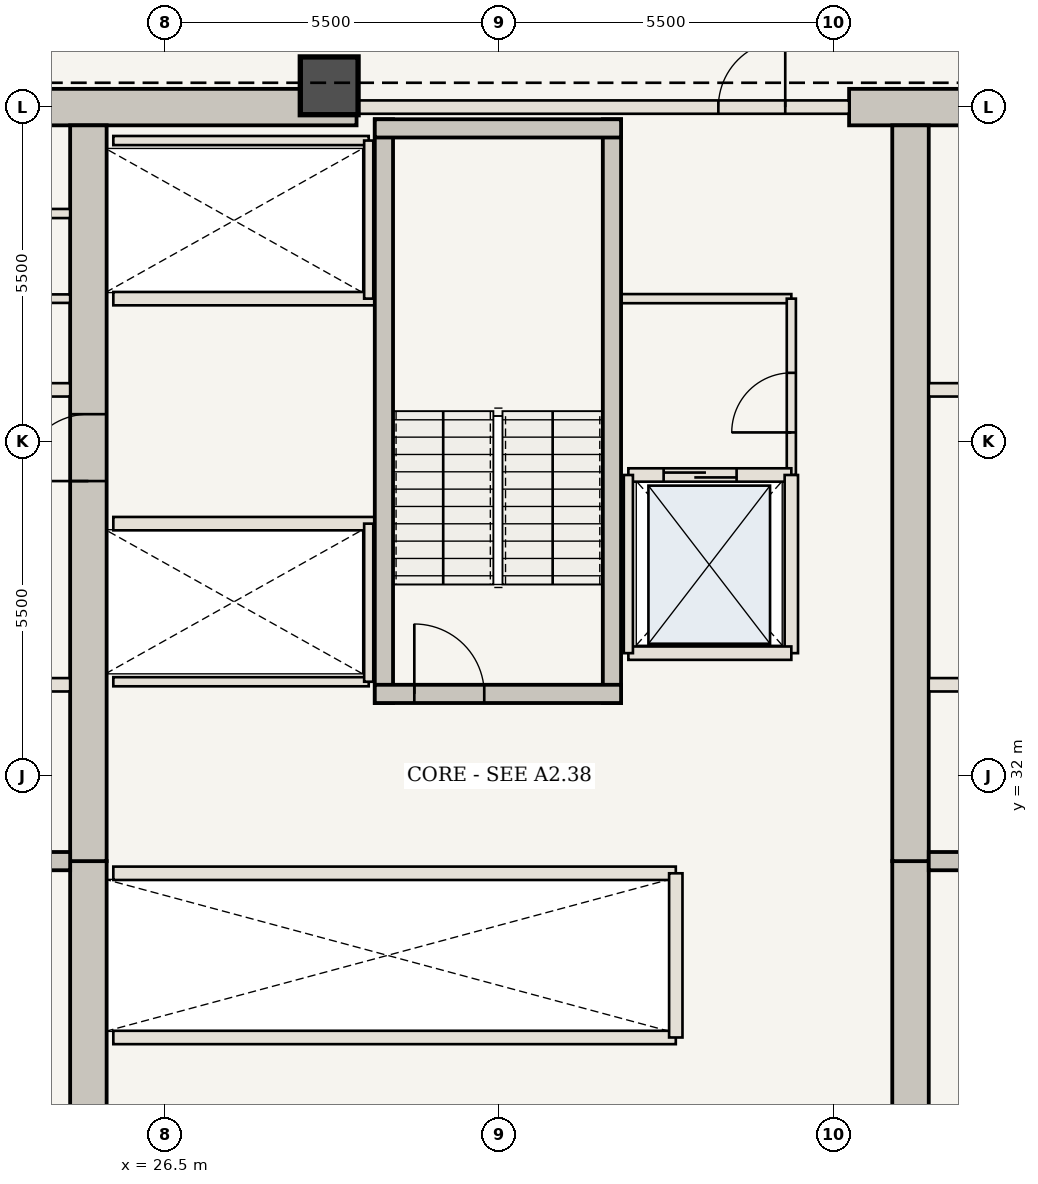
"""IFC4 building model, lengths in metres.
Left out: names, types, materials, properties, quantities, classifications, styles, units other than length and angle.
Written with IfcOpenShell. Run it as: python <this file> out.ifc"""

import sys

from ifc_helpers import new_model, si_unit, direction, frame, frame_2d, origin, origin_2d, place, context, subcontext, project, spatial, rectangle, extrude, element, fill, save


model = new_model("IFC4")
c1 = context("Model", 3, precision=1e-05, world=origin(), true_north=direction((0.0, 1.0)))
c2 = subcontext(c1, "Body", "Model", "MODEL_VIEW")
j1 = project(units=[si_unit("LENGTHUNIT", "METRE"), si_unit("PLANEANGLEUNIT", "RADIAN")], contexts=[c1])
p1 = place(None, origin())
s1 = spatial("IfcSite", under=j1, at=p1, CompositionType="ELEMENT")
p2 = place(p1, origin())
s2 = spatial("IfcBuilding", under=s1, at=p2, CompositionType="ELEMENT")
p3 = place(p2, frame((0.0, 0.0, 168.35)))
s3 = spatial("IfcBuildingStorey", under=s2, at=p3, CompositionType="ELEMENT", Elevation=168.35)
p4 = place(p3, frame((21.41, 43.0, 0.0), z_axis=(0.0, 0.0, 1.0), x_axis=(1.0, 0.0, 0.0)))
e1 = element("IfcWall", 1, at=p4, inside=s3, PredefinedType="SHEAR", context=c2, shape_type="SweptSolid", body=[
    extrude(rectangle(XDim=8.24, YDim=0.6, at=frame_2d((4.12, 0.0))), origin(), (0.0, 0.0, 1.0), 3.85),
])
p5 = place(p3, frame((37.75, 43.0, 0.0), z_axis=(0.0, 0.0, 1.0), x_axis=(1.0, 0.0, 0.0)))
e2 = element("IfcWall", 2, at=p5, inside=s3, PredefinedType="SHEAR", context=c2, shape_type="SweptSolid", body=[
    extrude(rectangle(XDim=4.84, YDim=0.6, at=frame_2d((2.42, 0.0))), origin(), (0.0, 0.0, 1.0), 3.85),
])
p6 = place(p3, frame((25.24, 21.25, 0.0), z_axis=(0.0, 0.0, 1.0), x_axis=(0.0, 1.0, 0.0)))
e3 = element("IfcWall", 3, at=p6, inside=s3, PredefinedType="SHEAR", context=c2, shape_type="SweptSolid", body=[
    extrude(rectangle(XDim=9.35, YDim=0.6, at=frame_2d((4.675, 0.0))), origin(), (0.0, 0.0, 1.0), 3.85),
])
p7 = place(p3, frame((25.24, 30.6, 0.0), z_axis=(0.0, 0.0, 1.0), x_axis=(0.0, 1.0, 0.0)))
e4 = element("IfcWall", 4, at=p7, inside=s3, PredefinedType="SHEAR", context=c2, shape_type="SweptSolid", body=[
    extrude(rectangle(XDim=12.1, YDim=0.6, at=frame_2d((6.05, 0.0))), origin(), (0.0, 0.0, 1.0), 3.85),
])
p8 = place(p7, frame((6.25, 0.0, 0.0)))
e5 = element("IfcOpeningElement", 5, at=p8, cuts=e4, PredefinedType="OPENING", context=c2, shape_type="SweptSolid", body=[
    extrude(rectangle(XDim=1.1, YDim=2.15, at=frame_2d((0.55, 1.075))), frame((0.0, 0.31, 0.0), z_axis=(0.0, -1.0, 0.0), x_axis=(1.0, 0.0, 0.0)), (0.0, 0.0, 1.0), 0.62),
])
p9 = place(p3, frame((38.76, 21.25, 0.0), z_axis=(0.0, 0.0, 1.0), x_axis=(0.0, 1.0, 0.0)))
e6 = element("IfcWall", 6, at=p9, inside=s3, PredefinedType="SHEAR", context=c2, shape_type="SweptSolid", body=[
    extrude(rectangle(XDim=9.35, YDim=0.6, at=frame_2d((4.675, 0.0))), origin(), (0.0, 0.0, 1.0), 3.85),
])
p10 = place(p3, frame((38.76, 30.6, 0.0), z_axis=(0.0, 0.0, 1.0), x_axis=(0.0, 1.0, 0.0)))
e7 = element("IfcWall", 7, at=p10, inside=s3, PredefinedType="SHEAR", context=c2, shape_type="SweptSolid", body=[
    extrude(rectangle(XDim=12.1, YDim=0.6, at=frame_2d((6.05, 0.0))), origin(), (0.0, 0.0, 1.0), 3.85),
])
p11 = place(p3, frame((29.2, 43.35, 0.0), z_axis=(0.0, 0.0, 1.0), x_axis=(1.0, 0.0, 0.0)))
e8 = element("IfcColumn", 8, at=p11, inside=s3, PredefinedType="COLUMN", context=c2, shape_type="SweptSolid", body=[
    extrude(rectangle(XDim=0.95, YDim=0.95, at=origin_2d()), origin(), (0.0, 0.0, 1.0), 3.85),
])
for number, where, z_axis, x_axis in (
    (9, (21.41, 30.6, 0.0), (0.0, 0.0, 1.0), (1.0, 0.0, 0.0)),
    (10, (39.06, 30.6, 0.0), (0.0, 0.0, 1.0), (1.0, 0.0, 0.0)),
):
    element("IfcWall", number, at=place(p3, frame(where, z_axis=z_axis, x_axis=x_axis)), inside=s3, PredefinedType="SHEAR", context=c2, shape_type="SweptSolid", body=[
        extrude(rectangle(XDim=3.53, YDim=0.3, at=frame_2d((1.765, 0.0))), origin(), (0.0, 0.0, 1.0), 3.685),
    ])
p12 = place(p3, frame((21.41, 33.5, 0.0), z_axis=(0.0, 0.0, 1.0), x_axis=(1.0, 0.0, 0.0)))
e11 = element("IfcWall", 11, at=p12, inside=s3, PredefinedType="STANDARD", context=c2, shape_type="SweptSolid", body=[
    extrude(rectangle(XDim=3.53, YDim=0.22, at=frame_2d((1.765, 0.0))), origin(), (0.0, 0.0, 1.0), 3.685),
])
p13 = place(p12, frame((0.75, 0.0, 0.0)))
e12 = element("IfcOpeningElement", 12, at=p13, cuts=e11, PredefinedType="OPENING", context=c2, shape_type="SweptSolid", body=[
    extrude(rectangle(XDim=1.2, YDim=2.2, at=frame_2d((0.6, 1.1))), frame((0.0, 0.12, 0.0), z_axis=(0.0, -1.0, 0.0), x_axis=(1.0, 0.0, 0.0)), (0.0, 0.0, 1.0), 0.24),
])
p14 = place(p3, frame((39.06, 33.5, 0.0), z_axis=(0.0, 0.0, 1.0), x_axis=(1.0, 0.0, 0.0)))
e13 = element("IfcWall", 13, at=p14, inside=s3, PredefinedType="STANDARD", context=c2, shape_type="SweptSolid", body=[
    extrude(rectangle(XDim=3.53, YDim=0.22, at=frame_2d((1.765, 0.0))), origin(), (0.0, 0.0, 1.0), 3.685),
])
p15 = place(p14, frame((1.55, 0.0, 0.0)))
e14 = element("IfcOpeningElement", 14, at=p15, cuts=e13, PredefinedType="OPENING", context=c2, shape_type="SweptSolid", body=[
    extrude(rectangle(XDim=1.2, YDim=2.2, at=frame_2d((0.6, 1.1))), frame((0.0, 0.12, 0.0), z_axis=(0.0, -1.0, 0.0), x_axis=(1.0, 0.0, 0.0)), (0.0, 0.0, 1.0), 0.24),
])
for number, where, z_axis, x_axis in (
    (15, (21.41, 38.35, 0.0), (0.0, 0.0, 1.0), (1.0, 0.0, 0.0)),
    (16, (39.06, 38.35, 0.0), (0.0, 0.0, 1.0), (1.0, 0.0, 0.0)),
):
    element("IfcWall", number, at=place(p3, frame(where, z_axis=z_axis, x_axis=x_axis)), inside=s3, PredefinedType="STANDARD", context=c2, shape_type="SweptSolid", body=[
        extrude(rectangle(XDim=3.53, YDim=0.22, at=frame_2d((1.765, 0.0))), origin(), (0.0, 0.0, 1.0), 3.685),
    ])
p16 = place(p3, frame((21.41, 39.85, 0.0), z_axis=(0.0, 0.0, 1.0), x_axis=(1.0, 0.0, 0.0)))
e17 = element("IfcWall", 17, at=p16, inside=s3, PredefinedType="STANDARD", context=c2, shape_type="SweptSolid", body=[
    extrude(rectangle(XDim=3.53, YDim=0.14, at=frame_2d((1.765, 0.0))), origin(), (0.0, 0.0, 1.0), 3.685),
])
p17 = place(p3, frame((21.41, 41.25, 0.0), z_axis=(0.0, 0.0, 1.0), x_axis=(1.0, 0.0, 0.0)))
e18 = element("IfcWall", 18, at=p17, inside=s3, PredefinedType="STANDARD", context=c2, shape_type="SweptSolid", body=[
    extrude(rectangle(XDim=3.53, YDim=0.15, at=frame_2d((1.765, 0.0))), origin(), (0.0, 0.0, 1.0), 3.685),
])
p18 = place(p3, frame((34.0, 39.85, 0.0), z_axis=(0.0, 0.0, 1.0), x_axis=(1.0, 0.0, 0.0)))
e19 = element("IfcWall", 19, at=p18, inside=s3, PredefinedType="STANDARD", context=c2, shape_type="SweptSolid", body=[
    extrude(rectangle(XDim=2.8, YDim=0.15, at=frame_2d((1.4, 0.0))), origin(), (0.0, 0.0, 1.0), 3.685),
])
p19 = place(p3, frame((36.8, 36.95, 0.0), z_axis=(0.0, 0.0, 1.0), x_axis=(0.0, 1.0, 0.0)))
e20 = element("IfcWall", 20, at=p19, inside=s3, PredefinedType="STANDARD", context=c2, shape_type="SweptSolid", body=[
    extrude(rectangle(XDim=2.9, YDim=0.15, at=frame_2d((1.45, 0.0))), origin(), (0.0, 0.0, 1.0), 3.685),
])
p20 = place(p19, frame((0.7, 0.0, 0.0)))
e21 = element("IfcOpeningElement", 21, at=p20, cuts=e20, PredefinedType="OPENING", context=c2, shape_type="SweptSolid", body=[
    extrude(rectangle(XDim=0.98, YDim=2.2, at=frame_2d((0.49, 1.1))), frame((0.0, 0.085, 0.0), z_axis=(0.0, -1.0, 0.0), x_axis=(1.0, 0.0, 0.0)), (0.0, 0.0, 1.0), 0.17),
])
for number, where, z_axis, x_axis in (
    (22, (25.65, 27.7, 0.0), (0.0, 0.0, 1.0), (1.0, 0.0, 0.0)),
    (23, (25.65, 30.4, 0.0), (0.0, 0.0, 1.0), (1.0, 0.0, 0.0)),
):
    element("IfcWall", number, at=place(p3, frame(where, z_axis=z_axis, x_axis=x_axis)), inside=s3, PredefinedType="STANDARD", context=c2, shape_type="SweptSolid", body=[
        extrude(rectangle(XDim=9.25, YDim=0.22, at=frame_2d((4.625, 0.0))), origin(), (0.0, 0.0, 1.0), 3.685),
    ])
p21 = place(p3, frame((34.9, 27.7, 0.0), z_axis=(0.0, 0.0, 1.0), x_axis=(0.0, 1.0, 0.0)))
e24 = element("IfcWall", 24, at=p21, inside=s3, PredefinedType="STANDARD", context=c2, shape_type="SweptSolid", body=[
    extrude(rectangle(XDim=2.7, YDim=0.22, at=frame_2d((1.35, 0.0))), origin(), (0.0, 0.0, 1.0), 3.685),
])
p22 = place(p3, frame((25.65, 36.15, 0.0), z_axis=(0.0, 0.0, 1.0), x_axis=(1.0, 0.0, 0.0)))
e25 = element("IfcWall", 25, at=p22, inside=s3, PredefinedType="STANDARD", context=c2, shape_type="SweptSolid", body=[
    extrude(rectangle(XDim=4.3, YDim=0.22, at=frame_2d((2.15, 0.0))), origin(), (0.0, 0.0, 1.0), 3.685),
])
p23 = place(p3, frame((25.65, 33.55, 0.0), z_axis=(0.0, 0.0, 1.0), x_axis=(1.0, 0.0, 0.0)))
e26 = element("IfcWall", 26, at=p23, inside=s3, PredefinedType="STANDARD", context=c2, shape_type="SweptSolid", body=[
    extrude(rectangle(XDim=4.2, YDim=0.15, at=frame_2d((2.1, 0.0))), origin(), (0.0, 0.0, 1.0), 3.685),
])
p24 = place(p3, frame((29.85, 33.55, 0.0), z_axis=(0.0, 0.0, 1.0), x_axis=(0.0, 1.0, 0.0)))
e27 = element("IfcWall", 27, at=p24, inside=s3, PredefinedType="STANDARD", context=c2, shape_type="SweptSolid", body=[
    extrude(rectangle(XDim=2.6, YDim=0.15, at=frame_2d((1.3, 0.0))), origin(), (0.0, 0.0, 1.0), 3.685),
])
p25 = place(p3, frame((25.65, 39.85, 0.0), z_axis=(0.0, 0.0, 1.0), x_axis=(1.0, 0.0, 0.0)))
e28 = element("IfcWall", 28, at=p25, inside=s3, PredefinedType="STANDARD", context=c2, shape_type="SweptSolid", body=[
    extrude(rectangle(XDim=4.3, YDim=0.22, at=frame_2d((2.15, 0.0))), origin(), (0.0, 0.0, 1.0), 3.685),
])
p26 = place(p3, frame((25.65, 42.45, 0.0), z_axis=(0.0, 0.0, 1.0), x_axis=(1.0, 0.0, 0.0)))
e29 = element("IfcWall", 29, at=p26, inside=s3, PredefinedType="STANDARD", context=c2, shape_type="SweptSolid", body=[
    extrude(rectangle(XDim=4.2, YDim=0.15, at=frame_2d((2.1, 0.0))), origin(), (0.0, 0.0, 1.0), 3.685),
])
p27 = place(p3, frame((29.85, 39.85, 0.0), z_axis=(0.0, 0.0, 1.0), x_axis=(0.0, 1.0, 0.0)))
e30 = element("IfcWall", 30, at=p27, inside=s3, PredefinedType="STANDARD", context=c2, shape_type="SweptSolid", body=[
    extrude(rectangle(XDim=2.6, YDim=0.15, at=frame_2d((1.3, 0.0))), origin(), (0.0, 0.0, 1.0), 3.685),
])
for number, where, z_axis, x_axis in (
    (31, (30.1, 33.2, 0.0), (0.0, 0.0, 1.0), (0.0, 1.0, 0.0)),
    (32, (33.85, 33.2, 0.0), (0.0, 0.0, 1.0), (0.0, 1.0, 0.0)),
):
    element("IfcWall", number, at=place(p3, frame(where, z_axis=z_axis, x_axis=x_axis)), inside=s3, PredefinedType="SHEAR", context=c2, shape_type="SweptSolid", body=[
        extrude(rectangle(XDim=9.6, YDim=0.3, at=frame_2d((4.8, 0.0))), origin(), (0.0, 0.0, 1.0), 3.685),
    ])
p28 = place(p3, frame((29.95, 33.35, 0.0), z_axis=(0.0, 0.0, 1.0), x_axis=(1.0, 0.0, 0.0)))
e33 = element("IfcWall", 33, at=p28, inside=s3, PredefinedType="SHEAR", context=c2, shape_type="SweptSolid", body=[
    extrude(rectangle(XDim=4.05, YDim=0.3, at=frame_2d((2.025, 0.0))), origin(), (0.0, 0.0, 1.0), 3.685),
])
p29 = place(p28, frame((0.65, 0.0, 0.0)))
e34 = element("IfcOpeningElement", 34, at=p29, cuts=e33, PredefinedType="OPENING", context=c2, shape_type="SweptSolid", body=[
    extrude(rectangle(XDim=1.15, YDim=2.15, at=frame_2d((0.575, 1.075))), frame((0.0, 0.16, 0.0), z_axis=(0.0, -1.0, 0.0), x_axis=(1.0, 0.0, 0.0)), (0.0, 0.0, 1.0), 0.32),
])
p30 = place(p3, frame((29.95, 42.65, 0.0), z_axis=(0.0, 0.0, 1.0), x_axis=(1.0, 0.0, 0.0)))
e35 = element("IfcWall", 35, at=p30, inside=s3, PredefinedType="SHEAR", context=c2, shape_type="SweptSolid", body=[
    extrude(rectangle(XDim=4.05, YDim=0.3, at=frame_2d((2.025, 0.0))), origin(), (0.0, 0.0, 1.0), 3.685),
])
p31 = place(p3, frame((29.65, 43.0, 0.0), z_axis=(0.0, 0.0, 1.0), x_axis=(1.0, 0.0, 0.0)))
e36 = element("IfcWall", 36, at=p31, inside=s3, PredefinedType="STANDARD", context=c2, shape_type="SweptSolid", body=[
    extrude(rectangle(XDim=8.1, YDim=0.22, at=frame_2d((4.05, 0.0))), origin(), (0.0, 0.0, 1.0), 3.685),
])
p32 = place(p31, frame((5.95, 0.0, 0.0)))
e37 = element("IfcOpeningElement", 37, at=p32, cuts=e36, PredefinedType="OPENING", context=c2, shape_type="SweptSolid", body=[
    extrude(rectangle(XDim=1.1, YDim=2.15, at=frame_2d((0.55, 1.075))), frame((0.0, 0.12, 0.0), z_axis=(0.0, -1.0, 0.0), x_axis=(1.0, 0.0, 0.0)), (0.0, 0.0, 1.0), 0.24),
])
p33 = place(p3, frame((34.12, 36.95, 0.0), z_axis=(0.0, 0.0, 1.0), x_axis=(1.0, 0.0, 0.0)))
e38 = element("IfcWall", 38, at=p33, inside=s3, PredefinedType="STANDARD", context=c2, shape_type="SweptSolid", body=[
    extrude(rectangle(XDim=2.68, YDim=0.22, at=frame_2d((1.34, 0.0))), origin(), (0.0, 0.0, 1.0), 3.685),
])
p34 = place(p33, frame((0.58, 0.0, 0.0)))
e39 = element("IfcOpeningElement", 39, at=p34, cuts=e38, PredefinedType="OPENING", context=c2, shape_type="SweptSolid", body=[
    extrude(rectangle(XDim=1.2, YDim=2.2, at=frame_2d((0.6, 1.1))), frame((0.0, 0.12, 0.0), z_axis=(0.0, -1.0, 0.0), x_axis=(1.0, 0.0, 0.0)), (0.0, 0.0, 1.0), 0.24),
])
p35 = place(p3, frame((36.8, 34.02, 0.0), z_axis=(0.0, 0.0, 1.0), x_axis=(0.0, 1.0, 0.0)))
e40 = element("IfcWall", 40, at=p35, inside=s3, PredefinedType="STANDARD", context=c2, shape_type="SweptSolid", body=[
    extrude(rectangle(XDim=2.93, YDim=0.22, at=frame_2d((1.465, 0.0))), origin(), (0.0, 0.0, 1.0), 3.685),
])
p36 = place(p3, frame((34.12, 34.02, 0.0), z_axis=(0.0, 0.0, 1.0), x_axis=(1.0, 0.0, 0.0)))
e41 = element("IfcWall", 41, at=p36, inside=s3, PredefinedType="STANDARD", context=c2, shape_type="SweptSolid", body=[
    extrude(rectangle(XDim=2.68, YDim=0.22, at=frame_2d((1.34, 0.0))), origin(), (0.0, 0.0, 1.0), 3.685),
])
p37 = place(p3, frame((34.12, 34.02, 0.0), z_axis=(0.0, 0.0, 1.0), x_axis=(0.0, 1.0, 0.0)))
e42 = element("IfcWall", 42, at=p37, inside=s3, PredefinedType="STANDARD", context=c2, shape_type="SweptSolid", body=[
    extrude(rectangle(XDim=2.93, YDim=0.15, at=frame_2d((1.465, 0.0))), origin(), (0.0, 0.0, 1.0), 3.685),
])
p38 = place(p8, origin())
e43 = element("IfcDoor", 43, at=p38, inside=s3, OperationType="SINGLE_SWING_LEFT", PredefinedType="DOOR", context=c2, shape_type="SweptSolid", body=[
    extrude(rectangle(XDim=1.1, YDim=2.15, at=frame_2d((0.55, 1.075))), frame((0.0, 0.025, 0.0), z_axis=(0.0, -1.0, 0.0), x_axis=(1.0, 0.0, 0.0)), (0.0, 0.0, 1.0), 0.05),
])
fill(e5, e43)
p39 = place(p20, origin())
e44 = element("IfcDoor", 44, at=p39, inside=s3, OperationType="SINGLE_SWING_LEFT", PredefinedType="DOOR", context=c2, shape_type="SweptSolid", body=[
    extrude(rectangle(XDim=0.98, YDim=2.2, at=frame_2d((0.49, 1.1))), frame((0.0, 0.025, 0.0), z_axis=(0.0, -1.0, 0.0), x_axis=(1.0, 0.0, 0.0)), (0.0, 0.0, 1.0), 0.05),
])
fill(e21, e44)
p40 = place(p29, origin())
e45 = element("IfcDoor", 45, at=p40, inside=s3, OperationType="SINGLE_SWING_LEFT", PredefinedType="DOOR", context=c2, shape_type="SweptSolid", body=[
    extrude(rectangle(XDim=1.15, YDim=2.15, at=frame_2d((0.575, 1.075))), frame((0.0, 0.025, 0.0), z_axis=(0.0, -1.0, 0.0), x_axis=(1.0, 0.0, 0.0)), (0.0, 0.0, 1.0), 0.05),
])
fill(e34, e45)
p41 = place(p32, origin())
e46 = element("IfcDoor", 46, at=p41, inside=s3, OperationType="SINGLE_SWING_RIGHT", PredefinedType="DOOR", context=c2, shape_type="SweptSolid", body=[
    extrude(rectangle(XDim=1.1, YDim=2.15, at=frame_2d((0.55, 1.075))), frame((0.0, 0.025, 0.0), z_axis=(0.0, -1.0, 0.0), x_axis=(1.0, 0.0, 0.0)), (0.0, 0.0, 1.0), 0.05),
])
fill(e37, e46)
p42 = place(p34, origin())
e47 = element("IfcDoor", 47, at=p42, inside=s3, OperationType="DOUBLE_DOOR_SLIDING", PredefinedType="DOOR", context=c2, shape_type="SweptSolid", body=[
    extrude(rectangle(XDim=1.2, YDim=2.2, at=frame_2d((0.6, 1.1))), frame((0.0, 0.025, 0.0), z_axis=(0.0, -1.0, 0.0), x_axis=(1.0, 0.0, 0.0)), (0.0, 0.0, 1.0), 0.05),
])
fill(e39, e47)
save(model, sys.argv[1])
